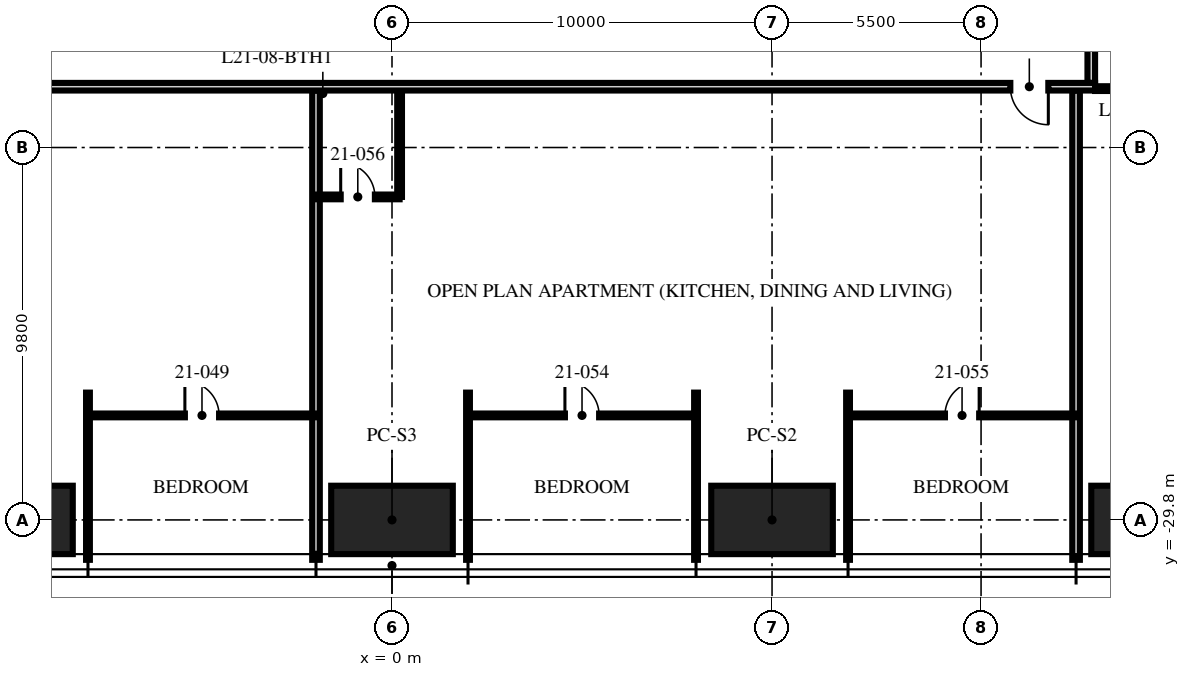
"""IFC4 building model, lengths in metres.
Left out: names, types, materials, properties, quantities, classifications, styles, units other than length and angle.
Written with IfcOpenShell. Run it as: python <this file> out.ifc"""

import sys

from ifc_helpers import new_model, si_unit, direction, frame, frame_2d, origin, origin_2d, place, context, subcontext, project, spatial, rectangle, hollow_rectangle, extrude, element, fill, save


model = new_model("IFC4")
c1 = context("Model", 3, precision=1e-05, world=origin(), true_north=direction((0.0, 1.0)))
c2 = subcontext(c1, "Body", "Model", "MODEL_VIEW")
j1 = project(units=[si_unit("LENGTHUNIT", "METRE"), si_unit("PLANEANGLEUNIT", "RADIAN")], contexts=[c1])
p1 = place(None, origin())
s1 = spatial("IfcSite", under=j1, at=p1, CompositionType="ELEMENT")
p2 = place(p1, origin())
s2 = spatial("IfcBuilding", under=s1, at=p2, CompositionType="ELEMENT")
p3 = place(p2, frame((0.0, 0.0, 84.75)))
s3 = spatial("IfcBuildingStorey", under=s2, at=p3, CompositionType="ELEMENT", Elevation=84.75)
for number, where, z_axis, x_axis in (
    (1, (20.0, -29.8, 0.0), (0.0, 0.0, 1.0), (1.0, 0.0, 0.0)),
    (2, (10.0, -29.8, 0.0), (0.0, 0.0, 1.0), (1.0, 0.0, 0.0)),
    (3, (0.0, -29.8, 0.0), (0.0, 0.0, 1.0), (1.0, 0.0, 0.0)),
    (4, (-10.0, -29.8, 0.0), (0.0, 0.0, 1.0), (1.0, 0.0, 0.0)),
):
    element("IfcColumn", number, at=place(p3, frame(where, z_axis=z_axis, x_axis=x_axis)), inside=s3, PredefinedType="COLUMN", context=c2, shape_type="SweptSolid", body=[
        extrude(hollow_rectangle(XDim=3.2, YDim=1.8, WallThickness=0.2, at=origin_2d()), origin(), (0.0, 0.0, 1.0), 3.75),
    ])
p4 = place(p3, frame((-8.0, -26.45, 0.0), z_axis=(0.0, 0.0, 1.0), x_axis=(0.0, -1.0, 0.0)))
e5 = element("IfcWall", 5, at=p4, inside=s3, PredefinedType="PARTITIONING", context=c2, shape_type="SweptSolid", body=[
    extrude(rectangle(XDim=4.4, YDim=0.1, at=frame_2d((2.2, 0.0))), origin(), (0.0, 0.0, 1.0), 2.71),
])
p5 = place(p3, frame((-2.0, -18.5, 0.0), z_axis=(0.0, 0.0, 1.0), x_axis=(0.0, -1.0, 0.0)))
e6 = element("IfcWall", 6, at=p5, inside=s3, PredefinedType="PARTITIONING", context=c2, shape_type="SweptSolid", body=[
    extrude(rectangle(XDim=12.35, YDim=0.2, at=frame_2d((6.175, 0.0))), origin(), (0.0, 0.0, 1.0), 2.71),
])
for number, where, z_axis, x_axis in (
    (7, (2.0, -26.45, 0.0), (0.0, 0.0, 1.0), (0.0, -1.0, 0.0)),
    (8, (8.0, -26.45, 0.0), (0.0, 0.0, 1.0), (0.0, -1.0, 0.0)),
    (9, (12.0, -26.45, 0.0), (0.0, 0.0, 1.0), (0.0, -1.0, 0.0)),
):
    element("IfcWall", number, at=place(p3, frame(where, z_axis=z_axis, x_axis=x_axis)), inside=s3, PredefinedType="PARTITIONING", context=c2, shape_type="SweptSolid", body=[
        extrude(rectangle(XDim=4.4, YDim=0.1, at=frame_2d((2.2, 0.0))), origin(), (0.0, 0.0, 1.0), 2.71),
    ])
p6 = place(p3, frame((18.0, -18.5, 0.0), z_axis=(0.0, 0.0, 1.0), x_axis=(0.0, -1.0, 0.0)))
e10 = element("IfcWall", 10, at=p6, inside=s3, PredefinedType="PARTITIONING", context=c2, shape_type="SweptSolid", body=[
    extrude(rectangle(XDim=12.35, YDim=0.2, at=frame_2d((6.175, 0.0))), origin(), (0.0, 0.0, 1.0), 2.3),
])
p7 = place(p3, frame((-8.0, -27.05, 0.0), z_axis=(0.0, 0.0, 1.0), x_axis=(1.0, 0.0, 0.0)))
e11 = element("IfcWall", 11, at=p7, inside=s3, PredefinedType="PARTITIONING", context=c2, shape_type="SweptSolid", body=[
    extrude(rectangle(XDim=6.0, YDim=0.1, at=frame_2d((3.0, 0.0))), origin(), (0.0, 0.0, 1.0), 2.61),
])
p8 = place(p7, frame((2.55, 0.0, 0.0)))
e12 = element("IfcOpeningElement", 12, at=p8, cuts=e11, PredefinedType="OPENING", context=c2, shape_type="SweptSolid", body=[
    extrude(rectangle(XDim=0.9, YDim=2.1, at=frame_2d((0.45, 1.05))), frame((0.0, 0.06, 0.0), z_axis=(0.0, -1.0, 0.0), x_axis=(1.0, 0.0, 0.0)), (0.0, 0.0, 1.0), 0.12),
])
p9 = place(p3, frame((2.0, -27.05, 0.0), z_axis=(0.0, 0.0, 1.0), x_axis=(1.0, 0.0, 0.0)))
e13 = element("IfcWall", 13, at=p9, inside=s3, PredefinedType="PARTITIONING", context=c2, shape_type="SweptSolid", body=[
    extrude(rectangle(XDim=6.0, YDim=0.1, at=frame_2d((3.0, 0.0))), origin(), (0.0, 0.0, 1.0), 2.61),
])
p10 = place(p9, frame((2.55, 0.0, 0.0)))
e14 = element("IfcOpeningElement", 14, at=p10, cuts=e13, PredefinedType="OPENING", context=c2, shape_type="SweptSolid", body=[
    extrude(rectangle(XDim=0.9, YDim=2.1, at=frame_2d((0.45, 1.05))), frame((0.0, 0.06, 0.0), z_axis=(0.0, -1.0, 0.0), x_axis=(1.0, 0.0, 0.0)), (0.0, 0.0, 1.0), 0.12),
])
p11 = place(p3, frame((12.0, -27.05, 0.0), z_axis=(0.0, 0.0, 1.0), x_axis=(1.0, 0.0, 0.0)))
e15 = element("IfcWall", 15, at=p11, inside=s3, PredefinedType="PARTITIONING", context=c2, shape_type="SweptSolid", body=[
    extrude(rectangle(XDim=6.0, YDim=0.1, at=frame_2d((3.0, 0.0))), origin(), (0.0, 0.0, 1.0), 2.61),
])
p12 = place(p11, frame((2.55, 0.0, 0.0)))
e16 = element("IfcOpeningElement", 16, at=p12, cuts=e15, PredefinedType="OPENING", context=c2, shape_type="SweptSolid", body=[
    extrude(rectangle(XDim=0.9, YDim=2.1, at=frame_2d((0.45, 1.05))), frame((0.0, 0.06, 0.0), z_axis=(0.0, -1.0, 0.0), x_axis=(1.0, 0.0, 0.0)), (0.0, 0.0, 1.0), 0.12),
])
p13 = place(p3, frame((-2.0, -21.3, 0.0), z_axis=(0.0, 0.0, 1.0), x_axis=(1.0, 0.0, 0.0)))
e17 = element("IfcWall", 17, at=p13, inside=s3, PredefinedType="PARTITIONING", context=c2, shape_type="SweptSolid", body=[
    extrude(rectangle(XDim=2.2, YDim=0.125, at=frame_2d((1.1, 0.0))), origin(), (0.0, 0.0, 1.0), 2.492),
])
p14 = place(p13, frame((0.65, 0.0, 0.0)))
e18 = element("IfcOpeningElement", 18, at=p14, cuts=e17, PredefinedType="OPENING", context=c2, shape_type="SweptSolid", body=[
    extrude(rectangle(XDim=0.9, YDim=2.1, at=frame_2d((0.45, 1.05))), frame((0.0, 0.073, 0.0), z_axis=(0.0, -1.0, 0.0), x_axis=(1.0, 0.0, 0.0)), (0.0, 0.0, 1.0), 0.145),
])
p15 = place(p3, frame((0.2, -18.5, 0.0), z_axis=(0.0, 0.0, 1.0), x_axis=(0.0, -1.0, 0.0)))
e19 = element("IfcWall", 19, at=p15, inside=s3, PredefinedType="PARTITIONING", context=c2, shape_type="SweptSolid", body=[
    extrude(rectangle(XDim=2.8, YDim=0.125, at=frame_2d((1.4, 0.0))), origin(), (0.0, 0.0, 1.0), 2.492),
])
p16 = place(p3, frame((18.5, -18.45, 0.0), z_axis=(0.0, 0.0, 1.0), x_axis=(1.0, 0.0, 0.0)))
e20 = element("IfcWall", 20, at=p16, inside=s3, PredefinedType="PARTITIONING", context=c2, shape_type="SweptSolid", body=[
    extrude(rectangle(XDim=2.8, YDim=0.125, at=frame_2d((1.4, 0.0))), origin(), (0.0, 0.0, 1.0), 2.3),
])
p17 = place(p3, frame((18.4, -18.3, 0.0), z_axis=(0.0, 0.0, 1.0), x_axis=(0.0, 1.0, 0.0)))
e21 = element("IfcWall", 21, at=p17, inside=s3, PredefinedType="PARTITIONING", context=c2, shape_type="SweptSolid", body=[
    extrude(rectangle(XDim=8.3, YDim=0.2, at=frame_2d((4.15, 0.0))), origin(), (0.0, 0.0, 1.0), 2.3),
])
p18 = place(p3, frame((18.5, -18.4, 0.0), z_axis=(0.0, 0.0, 1.0), x_axis=(-1.0, 0.0, 0.0)))
e22 = element("IfcWall", 22, at=p18, inside=s3, PredefinedType="PARTITIONING", context=c2, shape_type="SweptSolid", body=[
    extrude(rectangle(XDim=37.0, YDim=0.2, at=frame_2d((18.5, 0.0))), origin(), (0.0, 0.0, 1.0), 2.3),
])
p19 = place(p18, frame((1.23, 0.0, 0.0)))
e23 = element("IfcOpeningElement", 23, at=p19, cuts=e22, PredefinedType="OPENING", context=c2, shape_type="SweptSolid", body=[
    extrude(rectangle(XDim=1.0, YDim=2.2, at=frame_2d((0.5, 1.1))), frame((0.0, 0.11, 0.0), z_axis=(0.0, -1.0, 0.0), x_axis=(1.0, 0.0, 0.0)), (0.0, 0.0, 1.0), 0.22),
])
p20 = place(p8, origin())
e24 = element("IfcDoor", 24, at=p20, inside=s3, OperationType="SINGLE_SWING_LEFT", PredefinedType="DOOR", context=c2, shape_type="SweptSolid", body=[
    extrude(rectangle(XDim=0.9, YDim=2.1, at=frame_2d((0.45, 1.05))), frame((0.0, 0.025, 0.0), z_axis=(0.0, -1.0, 0.0), x_axis=(1.0, 0.0, 0.0)), (0.0, 0.0, 1.0), 0.05),
])
fill(e12, e24)
p21 = place(p10, origin())
e25 = element("IfcDoor", 25, at=p21, inside=s3, OperationType="SINGLE_SWING_LEFT", PredefinedType="DOOR", context=c2, shape_type="SweptSolid", body=[
    extrude(rectangle(XDim=0.9, YDim=2.1, at=frame_2d((0.45, 1.05))), frame((0.0, 0.025, 0.0), z_axis=(0.0, -1.0, 0.0), x_axis=(1.0, 0.0, 0.0)), (0.0, 0.0, 1.0), 0.05),
])
fill(e14, e25)
p22 = place(p12, origin())
e26 = element("IfcDoor", 26, at=p22, inside=s3, OperationType="SINGLE_SWING_RIGHT", PredefinedType="DOOR", context=c2, shape_type="SweptSolid", body=[
    extrude(rectangle(XDim=0.9, YDim=2.1, at=frame_2d((0.45, 1.05))), frame((0.0, 0.025, 0.0), z_axis=(0.0, -1.0, 0.0), x_axis=(1.0, 0.0, 0.0)), (0.0, 0.0, 1.0), 0.05),
])
fill(e16, e26)
p23 = place(p14, origin())
e27 = element("IfcDoor", 27, at=p23, inside=s3, OperationType="SINGLE_SWING_LEFT", PredefinedType="DOOR", context=c2, shape_type="SweptSolid", body=[
    extrude(rectangle(XDim=0.9, YDim=2.1, at=frame_2d((0.45, 1.05))), frame((0.0, 0.025, 0.0), z_axis=(0.0, -1.0, 0.0), x_axis=(1.0, 0.0, 0.0)), (0.0, 0.0, 1.0), 0.05),
])
fill(e18, e27)
p24 = place(p19, origin())
e28 = element("IfcDoor", 28, at=p24, inside=s3, OperationType="SINGLE_SWING_LEFT", PredefinedType="DOOR", context=c2, shape_type="SweptSolid", body=[
    extrude(rectangle(XDim=1.0, YDim=2.2, at=frame_2d((0.5, 1.1))), frame((0.0, 0.025, 0.0), z_axis=(0.0, -1.0, 0.0), x_axis=(1.0, 0.0, 0.0)), (0.0, 0.0, 1.0), 0.05),
])
fill(e23, e28)
save(model, sys.argv[1])
